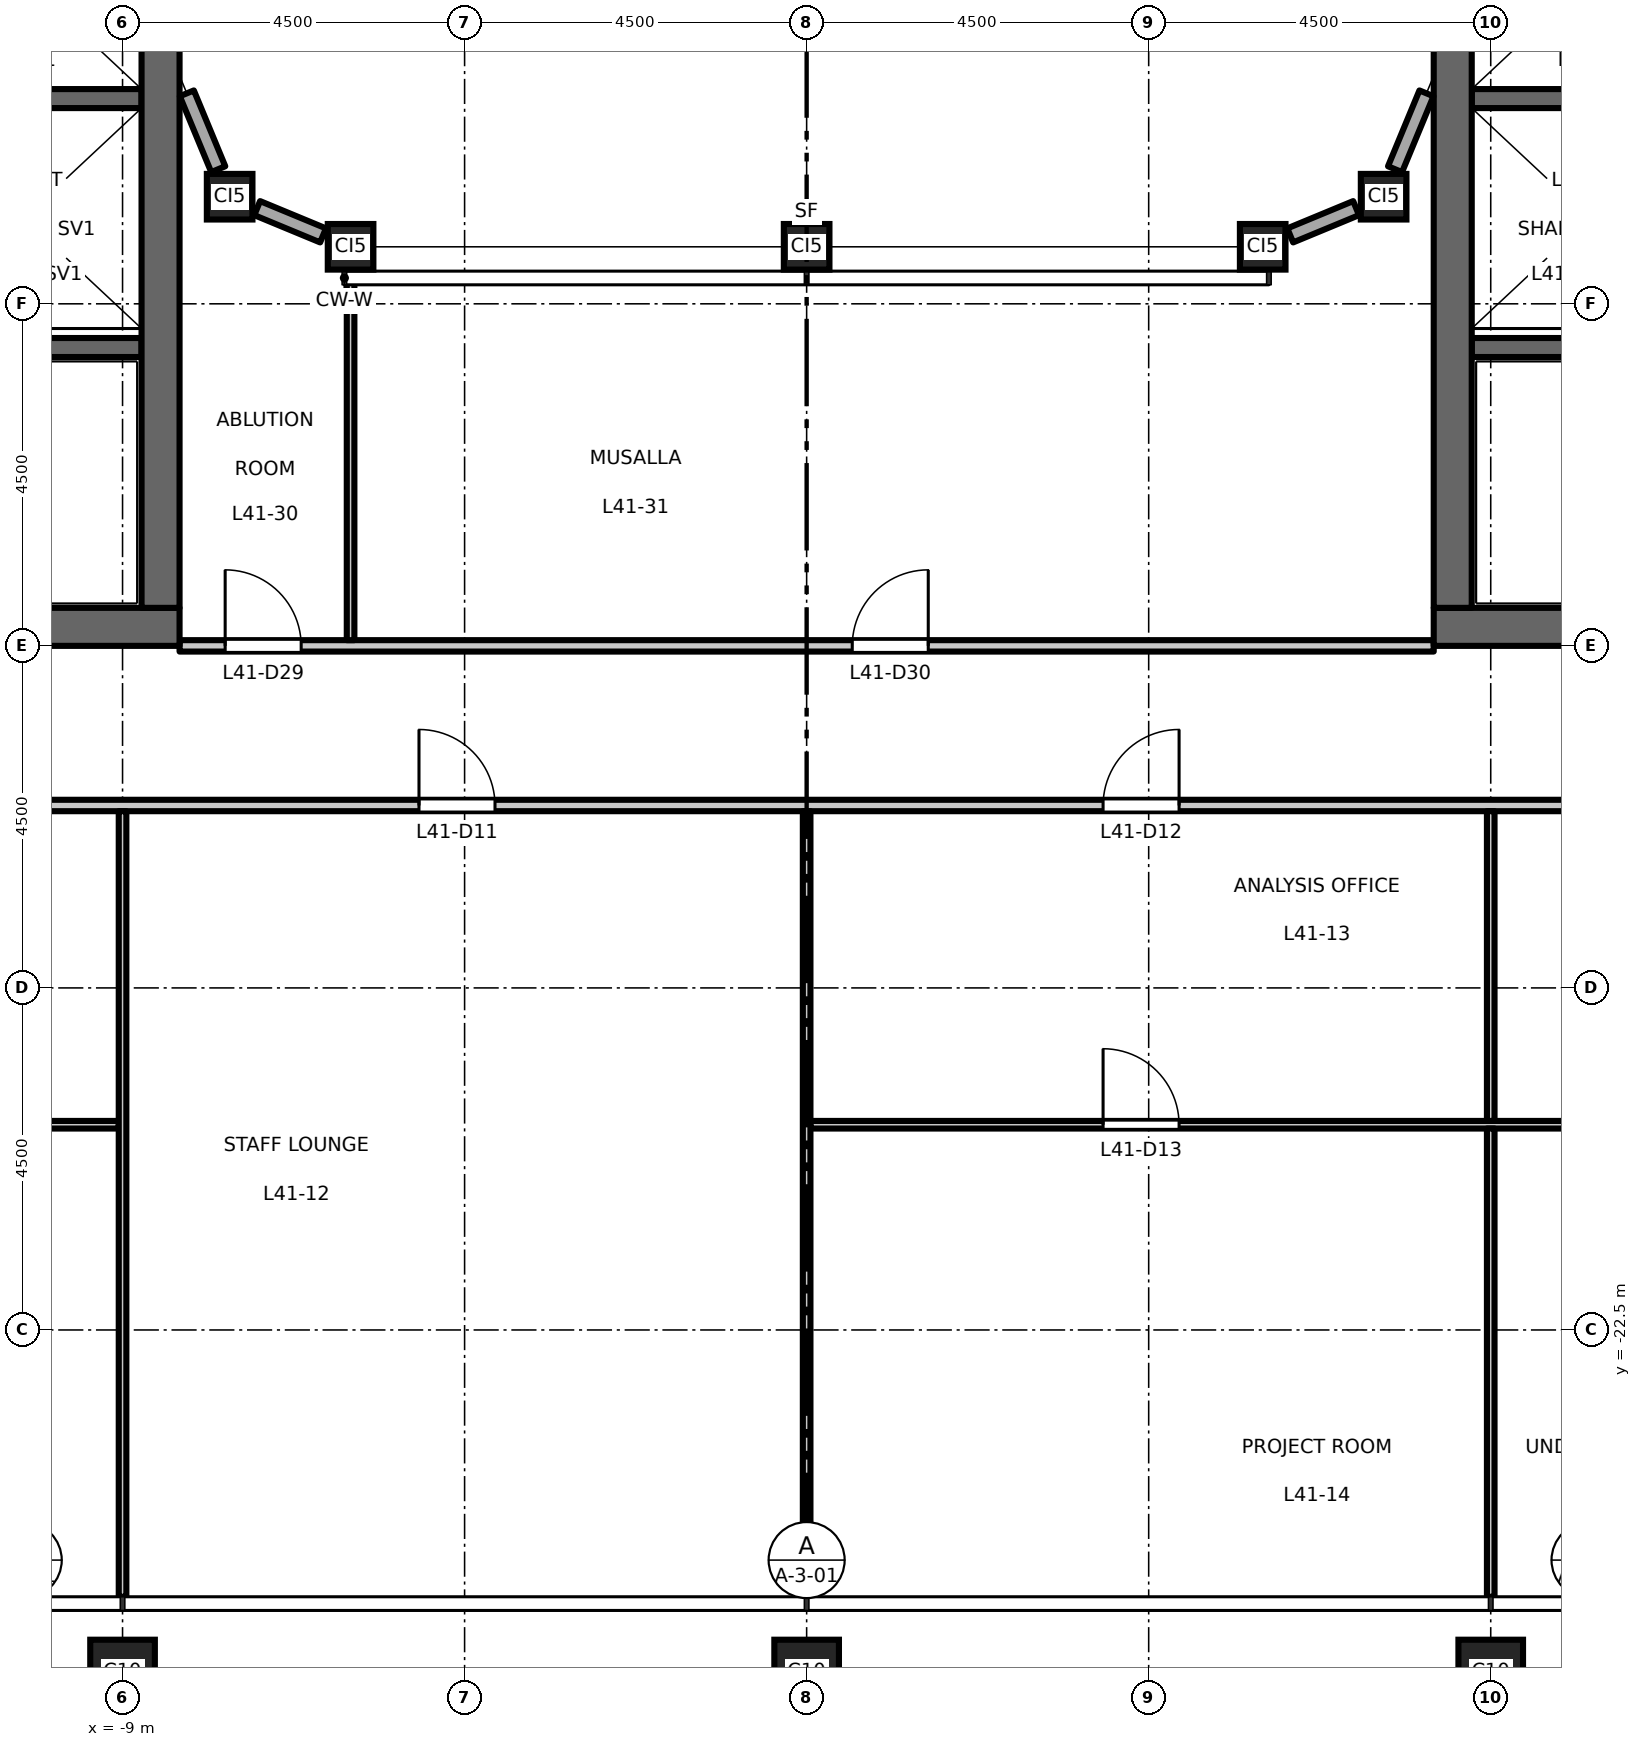
"""IFC4 building model, lengths in metres.
Left out: names, types, materials, properties, quantities, classifications, styles, units other than length and angle.
Written with IfcOpenShell. Run it as: python <this file> out.ifc"""

import sys

from ifc_helpers import new_model, si_unit, direction, frame, frame_2d, origin, origin_2d, place, context, subcontext, project, spatial, rectangle, hollow_rectangle, extrude, element, fill, save


model = new_model("IFC4")
c1 = context("Model", 3, precision=1e-05, world=origin(), true_north=direction((0.0, 1.0)))
c2 = subcontext(c1, "Body", "Model", "MODEL_VIEW")
j1 = project(units=[si_unit("LENGTHUNIT", "METRE"), si_unit("PLANEANGLEUNIT", "RADIAN")], contexts=[c1])
p1 = place(None, origin())
s1 = spatial("IfcSite", under=j1, at=p1, CompositionType="ELEMENT")
p2 = place(p1, origin())
s2 = spatial("IfcBuilding", under=s1, at=p2, CompositionType="ELEMENT")
p3 = place(p2, frame((0.0, 0.0, 192.7)))
s3 = spatial("IfcBuildingStorey", under=s2, at=p3, CompositionType="ELEMENT", Elevation=192.7)
for number, where, z_axis, x_axis in (
    (1, (-9.0, -27.0, 0.0), (0.0, 0.0, 1.0), (1.0, 0.0, 0.0)),
    (2, (0.0, -27.0, 0.0), (0.0, 0.0, 1.0), (1.0, 0.0, 0.0)),
    (3, (9.0, -27.0, 0.0), (0.0, 0.0, 1.0), (1.0, 0.0, 0.0)),
):
    element("IfcColumn", number, at=place(p3, frame(where, z_axis=z_axis, x_axis=x_axis)), inside=s3, PredefinedType="COLUMN", context=c2, shape_type="SweptSolid", body=[
        extrude(hollow_rectangle(XDim=0.85, YDim=0.85, WallThickness=0.05, at=origin_2d()), origin(), (0.0, 0.0, 1.0), 4.5),
    ])
for number, where, z_axis, x_axis in (
    (4, (-7.591, -7.591, 0.0), (0.0, 0.0, 1.0), (1.0, 0.0, 0.0)),
    (5, (-6.0, -8.25, 0.0), (0.0, 0.0, 1.0), (1.0, 0.0, 0.0)),
    (6, (0.0, -8.25, 0.0), (0.0, 0.0, 1.0), (1.0, 0.0, 0.0)),
    (7, (6.0, -8.25, 0.0), (0.0, 0.0, 1.0), (1.0, 0.0, 0.0)),
    (8, (7.591, -7.591, 0.0), (0.0, 0.0, 1.0), (1.0, 0.0, 0.0)),
):
    element("IfcColumn", number, at=place(p3, frame(where, z_axis=z_axis, x_axis=x_axis)), inside=s3, PredefinedType="COLUMN", context=c2, shape_type="SweptSolid", body=[
        extrude(hollow_rectangle(XDim=0.6, YDim=0.6, WallThickness=0.032, at=origin_2d()), origin(), (0.0, 0.0, 1.0), 4.5),
    ])
p4 = place(p3, frame((-8.75, -6.3, 0.0), z_axis=(0.0, 0.0, 1.0), x_axis=(-1.0, 0.0, 0.0)))
e9 = element("IfcWall", 9, at=p4, inside=s3, PredefinedType="SHEAR", context=c2, shape_type="SweptSolid", body=[
    extrude(rectangle(XDim=3.1, YDim=0.25, at=frame_2d((1.55, 0.0))), origin(), (0.0, 0.0, 1.0), 4.35),
])
p5 = place(p3, frame((-8.75, -9.575, 0.0), z_axis=(0.0, 0.0, 1.0), x_axis=(-1.0, 0.0, 0.0)))
e10 = element("IfcWall", 10, at=p5, inside=s3, PredefinedType="SHEAR", context=c2, shape_type="SweptSolid", body=[
    extrude(rectangle(XDim=8.0, YDim=0.25, at=frame_2d((4.0, 0.0))), origin(), (0.0, 0.0, 1.0), 4.35),
])
p6 = place(p5, frame((6.65, 0.0, 0.0)))
e11 = element("IfcOpeningElement", 11, at=p6, cuts=e10, PredefinedType="OPENING", context=c2, shape_type="SweptSolid", body=[
    extrude(rectangle(XDim=1.1, YDim=2.1, at=frame_2d((0.55, 1.05))), frame((0.0, 0.135, 0.0), z_axis=(0.0, -1.0, 0.0), x_axis=(1.0, 0.0, 0.0)), (0.0, 0.0, 1.0), 0.27),
])
p7 = place(p3, frame((-8.25, -13.25, 0.0), z_axis=(0.0, 0.0, 1.0), x_axis=(-1.0, 0.0, 0.0)))
e12 = element("IfcWall", 12, at=p7, inside=s3, PredefinedType="SHEAR", context=c2, shape_type="SweptSolid", body=[
    extrude(rectangle(XDim=13.5, YDim=0.5, at=frame_2d((6.75, 0.0))), origin(), (0.0, 0.0, 1.0), 4.35),
])
p8 = place(p3, frame((-8.5, -13.0, 0.0), z_axis=(0.0, 0.0, 1.0), x_axis=(0.0, 1.0, 0.0)))
e13 = element("IfcWall", 13, at=p8, inside=s3, PredefinedType="SHEAR", context=c2, shape_type="SweptSolid", body=[
    extrude(rectangle(XDim=26.0, YDim=0.5, at=frame_2d((13.0, 0.0))), origin(), (0.0, 0.0, 1.0), 4.35),
])
p9 = place(p3, frame((8.75, -6.3, 0.0), z_axis=(0.0, 0.0, 1.0), x_axis=(1.0, 0.0, 0.0)))
e14 = element("IfcWall", 14, at=p9, inside=s3, PredefinedType="SHEAR", context=c2, shape_type="SweptSolid", body=[
    extrude(rectangle(XDim=3.1, YDim=0.25, at=frame_2d((1.55, 0.0))), origin(), (0.0, 0.0, 1.0), 4.35),
])
p10 = place(p3, frame((8.75, -9.575, 0.0), z_axis=(0.0, 0.0, 1.0), x_axis=(1.0, 0.0, 0.0)))
e15 = element("IfcWall", 15, at=p10, inside=s3, PredefinedType="SHEAR", context=c2, shape_type="SweptSolid", body=[
    extrude(rectangle(XDim=8.0, YDim=0.25, at=frame_2d((4.0, 0.0))), origin(), (0.0, 0.0, 1.0), 4.35),
])
p11 = place(p10, frame((6.65, 0.0, 0.0)))
e16 = element("IfcOpeningElement", 16, at=p11, cuts=e15, PredefinedType="OPENING", context=c2, shape_type="SweptSolid", body=[
    extrude(rectangle(XDim=1.1, YDim=2.1, at=frame_2d((0.55, 1.05))), frame((0.0, 0.135, 0.0), z_axis=(0.0, -1.0, 0.0), x_axis=(1.0, 0.0, 0.0)), (0.0, 0.0, 1.0), 0.27),
])
p12 = place(p3, frame((8.25, -13.25, 0.0), z_axis=(0.0, 0.0, 1.0), x_axis=(1.0, 0.0, 0.0)))
e17 = element("IfcWall", 17, at=p12, inside=s3, PredefinedType="SHEAR", context=c2, shape_type="SweptSolid", body=[
    extrude(rectangle(XDim=13.5, YDim=0.5, at=frame_2d((6.75, 0.0))), origin(), (0.0, 0.0, 1.0), 4.35),
])
p13 = place(p3, frame((8.5, -13.0, 0.0), z_axis=(0.0, 0.0, 1.0), x_axis=(0.0, 1.0, 0.0)))
e18 = element("IfcWall", 18, at=p13, inside=s3, PredefinedType="SHEAR", context=c2, shape_type="SweptSolid", body=[
    extrude(rectangle(XDim=26.0, YDim=0.5, at=frame_2d((13.0, 0.0))), origin(), (0.0, 0.0, 1.0), 4.35),
])
p14 = place(p3, frame((6.362, -8.1, 0.0), z_axis=(0.0, 0.0, 1.0), x_axis=(0.923829670615, 0.382803787458, 0.0)))
e19 = element("IfcWall", 19, at=p14, inside=s3, PredefinedType="STANDARD", context=c2, shape_type="SweptSolid", body=[
    extrude(rectangle(XDim=0.938, YDim=0.2, at=frame_2d((0.469, 0.0))), origin(), (0.0, 0.0, 1.0), 3.918),
])
for number, where, z_axis, x_axis in (
    (20, (7.741, -7.229, 0.0), (0.0, 0.0, 1.0), (0.383, 0.924, 0.0)),
    (21, (-8.154, -6.231, 0.0), (0.0, 0.0, 1.0), (0.383, -0.924, 0.0)),
):
    element("IfcWall", number, at=place(p3, frame(where, z_axis=z_axis, x_axis=x_axis)), inside=s3, PredefinedType="STANDARD", context=c2, shape_type="SweptSolid", body=[
        extrude(rectangle(XDim=1.08, YDim=0.2, at=frame_2d((0.54, 0.0))), origin(), (0.0, 0.0, 1.0), 3.918),
    ])
p15 = place(p3, frame((-7.229, -7.741, 0.0), z_axis=(0.0, 0.0, 1.0), x_axis=(0.923829670615, -0.382803787458, 0.0)))
e22 = element("IfcWall", 22, at=p15, inside=s3, PredefinedType="STANDARD", context=c2, shape_type="SweptSolid", body=[
    extrude(rectangle(XDim=0.938, YDim=0.2, at=frame_2d((0.469, 0.0))), origin(), (0.0, 0.0, 1.0), 3.918),
])
p16 = place(p3, frame((-17.95, -19.8, 0.0), z_axis=(0.0, 0.0, 1.0), x_axis=(1.0, 0.0, 0.0)))
e23 = element("IfcWall", 23, at=p16, inside=s3, PredefinedType="PARTITIONING", context=c2, shape_type="SweptSolid", body=[
    extrude(rectangle(XDim=8.9, YDim=0.1, at=frame_2d((4.45, 0.0))), origin(), (0.0, 0.0, 1.0), 4.35),
])
p17 = place(p16, frame((3.85, 0.0, 0.0)))
e24 = element("IfcOpeningElement", 24, at=p17, cuts=e23, PredefinedType="OPENING", context=c2, shape_type="SweptSolid", body=[
    extrude(rectangle(XDim=1.0, YDim=2.1, at=frame_2d((0.5, 1.05))), frame((0.0, 0.06, 0.0), z_axis=(0.0, -1.0, 0.0), x_axis=(1.0, 0.0, 0.0)), (0.0, 0.0, 1.0), 0.12),
])
p18 = place(p3, frame((0.05, -19.8, 0.0), z_axis=(0.0, 0.0, 1.0), x_axis=(1.0, 0.0, 0.0)))
e25 = element("IfcWall", 25, at=p18, inside=s3, PredefinedType="PARTITIONING", context=c2, shape_type="SweptSolid", body=[
    extrude(rectangle(XDim=17.9, YDim=0.1, at=frame_2d((8.95, 0.0))), origin(), (0.0, 0.0, 1.0), 4.35),
])
p19 = place(p18, frame((3.85, 0.0, 0.0)))
e26 = element("IfcOpeningElement", 26, at=p19, cuts=e25, PredefinedType="OPENING", context=c2, shape_type="SweptSolid", body=[
    extrude(rectangle(XDim=1.0, YDim=2.1, at=frame_2d((0.5, 1.05))), frame((0.0, 0.06, 0.0), z_axis=(0.0, -1.0, 0.0), x_axis=(1.0, 0.0, 0.0)), (0.0, 0.0, 1.0), 0.12),
])
p20 = place(p18, frame((12.85, 0.0, 0.0)))
e27 = element("IfcOpeningElement", 27, at=p20, cuts=e25, PredefinedType="OPENING", context=c2, shape_type="SweptSolid", body=[
    extrude(rectangle(XDim=1.0, YDim=2.1, at=frame_2d((0.5, 1.05))), frame((0.0, 0.06, 0.0), z_axis=(0.0, -1.0, 0.0), x_axis=(1.0, 0.0, 0.0)), (0.0, 0.0, 1.0), 0.12),
])
p21 = place(p3, frame((-26.01, -15.6, 0.0), z_axis=(0.0, 0.0, 1.0), x_axis=(1.0, 0.0, 0.0)))
e28 = element("IfcWall", 28, at=p21, inside=s3, PredefinedType="PARTITIONING", context=c2, shape_type="SweptSolid", body=[
    extrude(rectangle(XDim=52.02, YDim=0.15, at=frame_2d((26.01, 0.0))), origin(), (0.0, 0.0, 1.0), 4.35),
])
p22 = place(p21, frame((11.91, 0.0, 0.0)))
e29 = element("IfcOpeningElement", 29, at=p22, cuts=e28, PredefinedType="OPENING", context=c2, shape_type="SweptSolid", body=[
    extrude(rectangle(XDim=1.0, YDim=2.1, at=frame_2d((0.5, 1.05))), frame((0.0, 0.085, 0.0), z_axis=(0.0, -1.0, 0.0), x_axis=(1.0, 0.0, 0.0)), (0.0, 0.0, 1.0), 0.17),
])
p23 = place(p21, frame((20.91, 0.0, 0.0)))
e30 = element("IfcOpeningElement", 30, at=p23, cuts=e28, PredefinedType="OPENING", context=c2, shape_type="SweptSolid", body=[
    extrude(rectangle(XDim=1.0, YDim=2.1, at=frame_2d((0.5, 1.05))), frame((0.0, 0.085, 0.0), z_axis=(0.0, -1.0, 0.0), x_axis=(1.0, 0.0, 0.0)), (0.0, 0.0, 1.0), 0.17),
])
p24 = place(p21, frame((29.91, 0.0, 0.0)))
e31 = element("IfcOpeningElement", 31, at=p24, cuts=e28, PredefinedType="OPENING", context=c2, shape_type="SweptSolid", body=[
    extrude(rectangle(XDim=1.0, YDim=2.1, at=frame_2d((0.5, 1.05))), frame((0.0, 0.085, 0.0), z_axis=(0.0, -1.0, 0.0), x_axis=(1.0, 0.0, 0.0)), (0.0, 0.0, 1.0), 0.17),
])
p25 = place(p21, frame((38.91, 0.0, 0.0)))
e32 = element("IfcOpeningElement", 32, at=p25, cuts=e28, PredefinedType="OPENING", context=c2, shape_type="SweptSolid", body=[
    extrude(rectangle(XDim=1.0, YDim=2.1, at=frame_2d((0.5, 1.05))), frame((0.0, 0.085, 0.0), z_axis=(0.0, -1.0, 0.0), x_axis=(1.0, 0.0, 0.0)), (0.0, 0.0, 1.0), 0.17),
])
p26 = place(p21, frame((3.4, 0.0, 0.0)))
e33 = element("IfcOpeningElement", 33, at=p26, cuts=e28, PredefinedType="OPENING", context=c2, shape_type="SweptSolid", body=[
    extrude(rectangle(XDim=1.0, YDim=2.1, at=frame_2d((0.5, 1.05))), frame((0.0, 0.085, 0.0), z_axis=(0.0, -1.0, 0.0), x_axis=(1.0, 0.0, 0.0)), (0.0, 0.0, 1.0), 0.17),
])
p27 = place(p21, frame((47.41, 0.0, 0.0)))
e34 = element("IfcOpeningElement", 34, at=p27, cuts=e28, PredefinedType="OPENING", context=c2, shape_type="SweptSolid", body=[
    extrude(rectangle(XDim=1.0, YDim=2.1, at=frame_2d((0.5, 1.05))), frame((0.0, 0.085, 0.0), z_axis=(0.0, -1.0, 0.0), x_axis=(1.0, 0.0, 0.0)), (0.0, 0.0, 1.0), 0.17),
])
p28 = place(p3, frame((-8.25, -13.5, 0.0), z_axis=(0.0, 0.0, 1.0), x_axis=(1.0, 0.0, 0.0)))
e35 = element("IfcWall", 35, at=p28, inside=s3, PredefinedType="PARTITIONING", context=c2, shape_type="SweptSolid", body=[
    extrude(rectangle(XDim=16.5, YDim=0.15, at=frame_2d((8.25, 0.0))), origin(), (0.0, 0.0, 1.0), 3.95),
])
p29 = place(p28, frame((0.6, 0.0, 0.0)))
e36 = element("IfcOpeningElement", 36, at=p29, cuts=e35, PredefinedType="OPENING", context=c2, shape_type="SweptSolid", body=[
    extrude(rectangle(XDim=1.0, YDim=2.1, at=frame_2d((0.5, 1.05))), frame((0.0, 0.085, 0.0), z_axis=(0.0, -1.0, 0.0), x_axis=(1.0, 0.0, 0.0)), (0.0, 0.0, 1.0), 0.17),
])
p30 = place(p28, frame((8.85, 0.0, 0.0)))
e37 = element("IfcOpeningElement", 37, at=p30, cuts=e35, PredefinedType="OPENING", context=c2, shape_type="SweptSolid", body=[
    extrude(rectangle(XDim=1.0, YDim=2.1, at=frame_2d((0.5, 1.05))), frame((0.0, 0.085, 0.0), z_axis=(0.0, -1.0, 0.0), x_axis=(1.0, 0.0, 0.0)), (0.0, 0.0, 1.0), 0.17),
])
p31 = place(p3, frame((-9.0, -26.01, 0.0), z_axis=(0.0, 0.0, 1.0), x_axis=(0.0, 1.0, 0.0)))
e38 = element("IfcWall", 38, at=p31, inside=s3, PredefinedType="PARTITIONING", context=c2, shape_type="SweptSolid", body=[
    extrude(rectangle(XDim=10.335, YDim=0.1, at=frame_2d((5.167, 0.0))), origin(), (0.0, 0.0, 1.0), 3.65),
])
p32 = place(p3, frame((-6.0, -13.425, 0.0), z_axis=(0.0, 0.0, 1.0), x_axis=(0.0, 1.0, 0.0)))
e39 = element("IfcWall", 39, at=p32, inside=s3, PredefinedType="PARTITIONING", context=c2, shape_type="SweptSolid", body=[
    extrude(rectangle(XDim=4.825, YDim=0.1, at=frame_2d((2.413, 0.0))), origin(), (0.0, 0.0, 1.0), 4.35),
])
p33 = place(p3, frame((0.0, -26.01, 0.0), z_axis=(0.0, 0.0, 1.0), x_axis=(0.0, 1.0, 0.0)))
e40 = element("IfcWall", 40, at=p33, inside=s3, PredefinedType="PARTITIONING", context=c2, shape_type="SweptSolid", body=[
    extrude(rectangle(XDim=10.335, YDim=0.1, at=frame_2d((5.167, 0.0))), origin(), (0.0, 0.0, 1.0), 3.55),
])
p34 = place(p3, frame((9.0, -26.01, 0.0), z_axis=(0.0, 0.0, 1.0), x_axis=(0.0, 1.0, 0.0)))
e41 = element("IfcWall", 41, at=p34, inside=s3, PredefinedType="PARTITIONING", context=c2, shape_type="SweptSolid", body=[
    extrude(rectangle(XDim=6.16, YDim=0.1, at=frame_2d((3.08, 0.0))), origin(), (0.0, 0.0, 1.0), 3.65),
])
p35 = place(p3, frame((9.0, -19.75, 0.0), z_axis=(0.0, 0.0, 1.0), x_axis=(0.0, 1.0, 0.0)))
e42 = element("IfcWall", 42, at=p35, inside=s3, PredefinedType="PARTITIONING", context=c2, shape_type="SweptSolid", body=[
    extrude(rectangle(XDim=4.075, YDim=0.1, at=frame_2d((2.038, 0.0))), origin(), (0.0, 0.0, 1.0), 3.65),
])
p36 = place(p23, origin())
e43 = element("IfcDoor", 43, at=p36, inside=s3, OperationType="SINGLE_SWING_LEFT", PredefinedType="DOOR", context=c2, shape_type="SweptSolid", body=[
    extrude(rectangle(XDim=1.0, YDim=2.1, at=frame_2d((0.5, 1.05))), frame((0.0, 0.025, 0.0), z_axis=(0.0, -1.0, 0.0), x_axis=(1.0, 0.0, 0.0)), (0.0, 0.0, 1.0), 0.05),
])
fill(e30, e43)
p37 = place(p24, origin())
e44 = element("IfcDoor", 44, at=p37, inside=s3, OperationType="SINGLE_SWING_RIGHT", PredefinedType="DOOR", context=c2, shape_type="SweptSolid", body=[
    extrude(rectangle(XDim=1.0, YDim=2.1, at=frame_2d((0.5, 1.05))), frame((0.0, 0.025, 0.0), z_axis=(0.0, -1.0, 0.0), x_axis=(1.0, 0.0, 0.0)), (0.0, 0.0, 1.0), 0.05),
])
fill(e31, e44)
p38 = place(p19, origin())
e45 = element("IfcDoor", 45, at=p38, inside=s3, OperationType="SINGLE_SWING_LEFT", PredefinedType="DOOR", context=c2, shape_type="SweptSolid", body=[
    extrude(rectangle(XDim=1.0, YDim=2.1, at=frame_2d((0.5, 1.05))), frame((0.0, 0.025, 0.0), z_axis=(0.0, -1.0, 0.0), x_axis=(1.0, 0.0, 0.0)), (0.0, 0.0, 1.0), 0.05),
])
fill(e26, e45)
p39 = place(p29, origin())
e46 = element("IfcDoor", 46, at=p39, inside=s3, OperationType="SINGLE_SWING_LEFT", PredefinedType="DOOR", context=c2, shape_type="SweptSolid", body=[
    extrude(rectangle(XDim=1.0, YDim=2.1, at=frame_2d((0.5, 1.05))), frame((0.0, 0.025, 0.0), z_axis=(0.0, -1.0, 0.0), x_axis=(1.0, 0.0, 0.0)), (0.0, 0.0, 1.0), 0.05),
])
fill(e36, e46)
p40 = place(p30, origin())
e47 = element("IfcDoor", 47, at=p40, inside=s3, OperationType="SINGLE_SWING_RIGHT", PredefinedType="DOOR", context=c2, shape_type="SweptSolid", body=[
    extrude(rectangle(XDim=1.0, YDim=2.1, at=frame_2d((0.5, 1.05))), frame((0.0, 0.025, 0.0), z_axis=(0.0, -1.0, 0.0), x_axis=(1.0, 0.0, 0.0)), (0.0, 0.0, 1.0), 0.05),
])
fill(e37, e47)
save(model, sys.argv[1])
